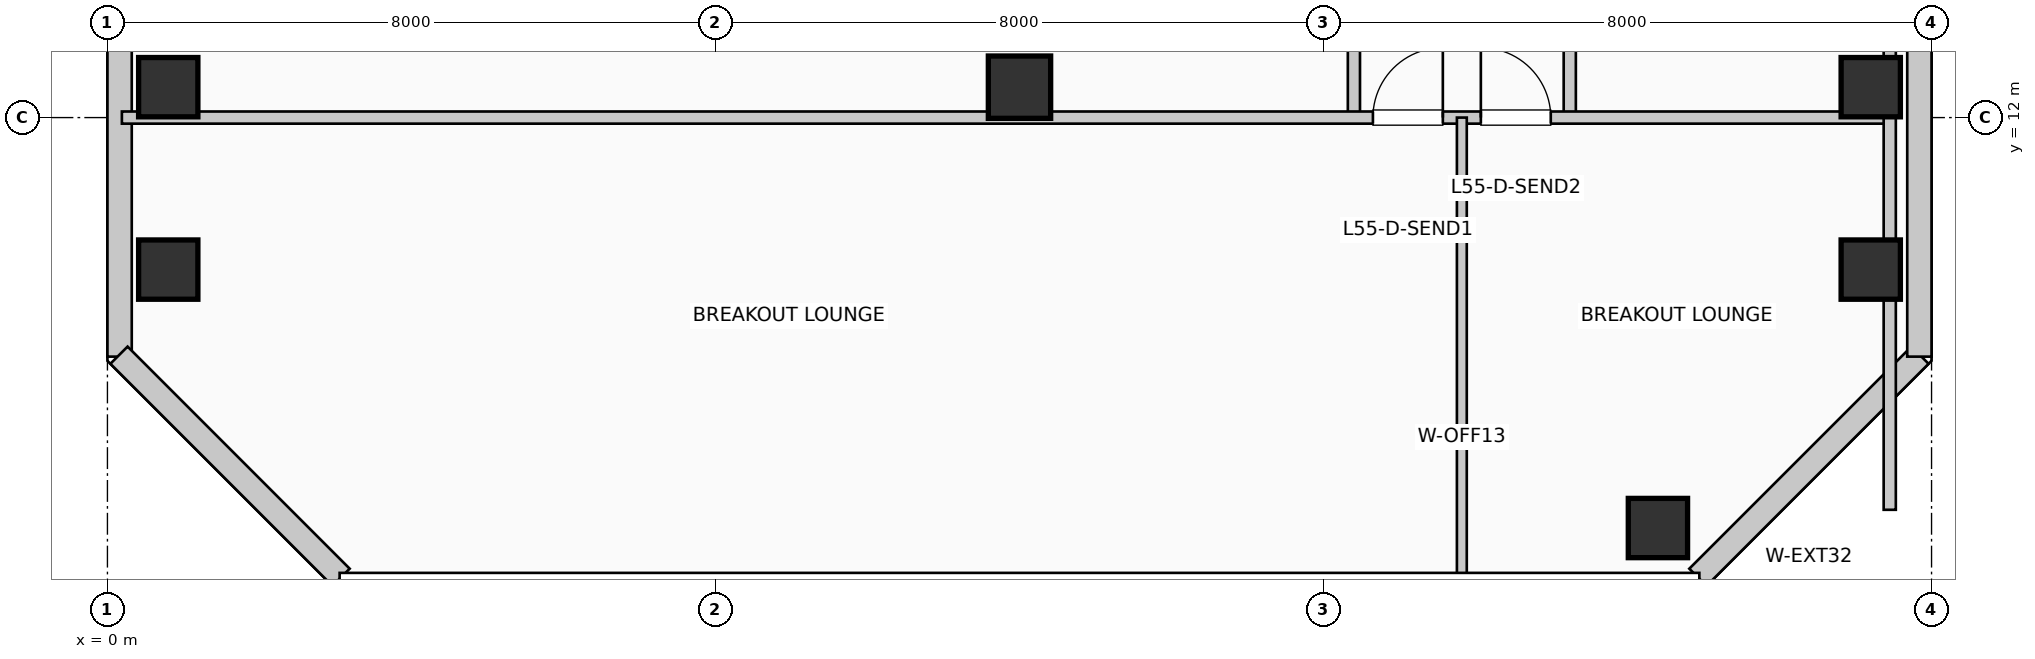
"""IFC4 building model, lengths in metres.
Left out: names, types, materials, properties, quantities, classifications, styles, units other than length and angle.
Written with IfcOpenShell. Run it as: python <this file> out.ifc"""

import sys

from ifc_helpers import new_model, si_unit, direction, frame, frame_2d, origin, origin_2d, place, context, subcontext, project, spatial, rectangle, extrude, element, fill, save


model = new_model("IFC4")
c1 = context("Model", 3, precision=1e-05, world=origin(), true_north=direction((0.0, 1.0)))
c2 = subcontext(c1, "Body", "Model", "MODEL_VIEW")
j1 = project(units=[si_unit("LENGTHUNIT", "METRE"), si_unit("PLANEANGLEUNIT", "RADIAN")], contexts=[c1])
p1 = place(None, origin())
s1 = spatial("IfcSite", under=j1, at=p1, CompositionType="ELEMENT")
p2 = place(p1, origin())
s2 = spatial("IfcBuilding", under=s1, at=p2, CompositionType="ELEMENT")
p3 = place(p2, frame((0.0, 0.0, 227.7)))
s3 = spatial("IfcBuildingStorey", under=s2, at=p3, CompositionType="ELEMENT", Elevation=227.7)
for number, where, z_axis, x_axis in (
    (1, (0.8, 10.0, 0.0), (0.0, 0.0, 1.0), (1.0, 0.0, 0.0)),
    (2, (0.8, 12.4, 0.0), (0.0, 0.0, 1.0), (1.0, 0.0, 0.0)),
):
    element("IfcColumn", number, at=place(p3, frame(where, z_axis=z_axis, x_axis=x_axis)), inside=s3, PredefinedType="COLUMN", context=c2, shape_type="SweptSolid", body=[
        extrude(rectangle(XDim=0.78, YDim=0.78, at=origin_2d()), origin(), (0.0, 0.0, 1.0), 3.96),
    ])
p4 = place(p3, frame((12.0, 12.4, 0.0), z_axis=(0.0, 0.0, 1.0), x_axis=(1.0, 0.0, 0.0)))
e3 = element("IfcColumn", 3, at=p4, inside=s3, PredefinedType="COLUMN", context=c2, shape_type="SweptSolid", body=[
    extrude(rectangle(XDim=0.82, YDim=0.82, at=origin_2d()), origin(), (0.0, 0.0, 1.0), 3.96),
])
for number, where, z_axis, x_axis in (
    (4, (20.4, 6.6, 0.0), (0.0, 0.0, 1.0), (1.0, 0.0, 0.0)),
    (5, (23.2, 10.0, 0.0), (0.0, 0.0, 1.0), (1.0, 0.0, 0.0)),
    (6, (23.2, 12.4, 0.0), (0.0, 0.0, 1.0), (1.0, 0.0, 0.0)),
):
    element("IfcColumn", number, at=place(p3, frame(where, z_axis=z_axis, x_axis=x_axis)), inside=s3, PredefinedType="COLUMN", context=c2, shape_type="SweptSolid", body=[
        extrude(rectangle(XDim=0.78, YDim=0.78, at=origin_2d()), origin(), (0.0, 0.0, 1.0), 3.96),
    ])
p5 = place(p3, frame((20.926, 5.952, 0.0), z_axis=(0.0, 0.0, 1.0), x_axis=(0.707077242712, 0.707136318428, 0.0)))
e7 = element("IfcWall", 7, at=p5, inside=s3, PredefinedType="SOLIDWALL", context=c2, shape_type="SweptSolid", body=[
    extrude(rectangle(XDim=4.133, YDim=0.32, at=frame_2d((2.066, 0.0))), origin(), (0.0, 0.0, 1.0), 3.71),
])
p6 = place(p3, frame((23.84, 8.855, 0.0), z_axis=(0.0, 0.0, 1.0), x_axis=(0.0, 1.0, 0.0)))
e8 = element("IfcWall", 8, at=p6, inside=s3, PredefinedType="SOLIDWALL", context=c2, shape_type="SweptSolid", body=[
    extrude(rectangle(XDim=11.09, YDim=0.32, at=frame_2d((5.545, 0.0))), origin(), (0.0, 0.0, 1.0), 3.71),
])
p7 = place(p3, frame((0.16, 34.395, 0.0), z_axis=(0.0, 0.0, 1.0), x_axis=(0.0, -1.0, 0.0)))
e9 = element("IfcWall", 9, at=p7, inside=s3, PredefinedType="SOLIDWALL", context=c2, shape_type="SweptSolid", body=[
    extrude(rectangle(XDim=25.54, YDim=0.32, at=frame_2d((12.77, 0.0))), origin(), (0.0, 0.0, 1.0), 3.71),
])
p8 = place(p3, frame((0.152, 8.874, 0.0), z_axis=(0.0, 0.0, 1.0), x_axis=(0.707077242712, -0.707136318428, 0.0)))
e10 = element("IfcWall", 10, at=p8, inside=s3, PredefinedType="SOLIDWALL", context=c2, shape_type="SweptSolid", body=[
    extrude(rectangle(XDim=4.133, YDim=0.32, at=frame_2d((2.066, 0.0))), origin(), (0.0, 0.0, 1.0), 3.71),
])
p9 = place(p3, frame((16.4, 12.0, 0.0), z_axis=(0.0, 0.0, 1.0), x_axis=(0.0, 1.0, 0.0)))
e11 = element("IfcWall", 11, at=p9, inside=s3, PredefinedType="PARTITIONING", context=c2, shape_type="SweptSolid", body=[
    extrude(rectangle(XDim=17.4, YDim=0.16, at=frame_2d((8.7, 0.0))), origin(), (0.0, 0.0, 1.0), 3.71),
])
p10 = place(p9, frame((3.433, 0.0, 0.0), z_axis=(0.0, 0.0, 1.0), x_axis=(-1.0, 0.0, 0.0)))
e12 = element("IfcOpeningElement", 12, at=p10, cuts=e11, PredefinedType="OPENING", context=c2, shape_type="SweptSolid", body=[
    extrude(rectangle(XDim=0.95, YDim=2.15, at=frame_2d((0.475, 1.075))), frame((0.0, 0.09, 0.0), z_axis=(0.0, -1.0, 0.0), x_axis=(1.0, 0.0, 0.0)), (0.0, 0.0, 1.0), 0.18),
])
p11 = place(p9, frame((9.349, 0.0, 0.0), z_axis=(0.0, 0.0, 1.0), x_axis=(-1.0, 0.0, 0.0)))
e13 = element("IfcOpeningElement", 13, at=p11, cuts=e11, PredefinedType="OPENING", context=c2, shape_type="SweptSolid", body=[
    extrude(rectangle(XDim=0.95, YDim=2.15, at=frame_2d((0.475, 1.075))), frame((0.0, 0.09, 0.0), z_axis=(0.0, -1.0, 0.0), x_axis=(1.0, 0.0, 0.0)), (0.0, 0.0, 1.0), 0.18),
])
p12 = place(p9, frame((15.091, 0.0, 0.0), z_axis=(0.0, 0.0, 1.0), x_axis=(-1.0, 0.0, 0.0)))
e14 = element("IfcOpeningElement", 14, at=p12, cuts=e11, PredefinedType="OPENING", context=c2, shape_type="SweptSolid", body=[
    extrude(rectangle(XDim=0.95, YDim=2.15, at=frame_2d((0.475, 1.075))), frame((0.0, 0.09, 0.0), z_axis=(0.0, -1.0, 0.0), x_axis=(1.0, 0.0, 0.0)), (0.0, 0.0, 1.0), 0.18),
])
p13 = place(p3, frame((19.24, 12.0, 0.0), z_axis=(0.0, 0.0, 1.0), x_axis=(0.0, 1.0, 0.0)))
e15 = element("IfcWall", 15, at=p13, inside=s3, PredefinedType="PARTITIONING", context=c2, shape_type="SweptSolid", body=[
    extrude(rectangle(XDim=17.4, YDim=0.16, at=frame_2d((8.7, 0.0))), origin(), (0.0, 0.0, 1.0), 3.71),
])
p14 = place(p13, frame((8.225, 0.0, 0.0)))
e16 = element("IfcOpeningElement", 16, at=p14, cuts=e15, PredefinedType="OPENING", context=c2, shape_type="SweptSolid", body=[
    extrude(rectangle(XDim=0.95, YDim=2.15, at=frame_2d((0.475, 1.075))), frame((0.0, 0.09, 0.0), z_axis=(0.0, -1.0, 0.0), x_axis=(1.0, 0.0, 0.0)), (0.0, 0.0, 1.0), 0.18),
])
p15 = place(p3, frame((0.19, 12.0, 0.0), z_axis=(0.0, 0.0, 1.0), x_axis=(1.0, 0.0, 0.0)))
e17 = element("IfcWall", 17, at=p15, inside=s3, PredefinedType="PARTITIONING", context=c2, shape_type="SweptSolid", body=[
    extrude(rectangle(XDim=23.26, YDim=0.16, at=frame_2d((11.63, 0.0))), origin(), (0.0, 0.0, 1.0), 3.095),
])
p16 = place(p15, frame((16.46, 0.0, 0.0)))
e18 = element("IfcOpeningElement", 18, at=p16, cuts=e17, PredefinedType="OPENING", context=c2, shape_type="SweptSolid", body=[
    extrude(rectangle(XDim=0.92, YDim=2.1, at=frame_2d((0.46, 1.05))), frame((0.0, 0.09, 0.0), z_axis=(0.0, -1.0, 0.0), x_axis=(1.0, 0.0, 0.0)), (0.0, 0.0, 1.0), 0.18),
])
p17 = place(p15, frame((17.88, 0.0, 0.0)))
e19 = element("IfcOpeningElement", 19, at=p17, cuts=e17, PredefinedType="OPENING", context=c2, shape_type="SweptSolid", body=[
    extrude(rectangle(XDim=0.92, YDim=2.1, at=frame_2d((0.46, 1.05))), frame((0.0, 0.09, 0.0), z_axis=(0.0, -1.0, 0.0), x_axis=(1.0, 0.0, 0.0)), (0.0, 0.0, 1.0), 0.18),
])
p18 = place(p3, frame((23.45, 6.84, 0.0), z_axis=(0.0, 0.0, 1.0), x_axis=(0.0, 1.0, 0.0)))
e20 = element("IfcWall", 20, at=p18, inside=s3, PredefinedType="PARTITIONING", context=c2, shape_type="SweptSolid", body=[
    extrude(rectangle(XDim=22.56, YDim=0.16, at=frame_2d((11.28, 0.0))), origin(), (0.0, 0.0, 1.0), 3.095),
])
p19 = place(p3, frame((17.82, 5.99, 0.0), z_axis=(0.0, 0.0, 1.0), x_axis=(0.0, 1.0, 0.0)))
e21 = element("IfcWall", 21, at=p19, inside=s3, PredefinedType="PARTITIONING", context=c2, shape_type="SweptSolid", body=[
    extrude(rectangle(XDim=6.01, YDim=0.13, at=frame_2d((3.005, 0.0))), origin(), (0.0, 0.0, 1.0), 3.71),
])
p20 = place(p16, origin())
e22 = element("IfcDoor", 22, at=p20, inside=s3, OperationType="SINGLE_SWING_RIGHT", PredefinedType="DOOR", context=c2, shape_type="SweptSolid", body=[
    extrude(rectangle(XDim=0.92, YDim=2.1, at=frame_2d((0.46, 1.05))), frame((0.0, 0.025, 0.0), z_axis=(0.0, -1.0, 0.0), x_axis=(1.0, 0.0, 0.0)), (0.0, 0.0, 1.0), 0.05),
])
fill(e18, e22)
p21 = place(p17, origin())
e23 = element("IfcDoor", 23, at=p21, inside=s3, OperationType="SINGLE_SWING_LEFT", PredefinedType="DOOR", context=c2, shape_type="SweptSolid", body=[
    extrude(rectangle(XDim=0.92, YDim=2.1, at=frame_2d((0.46, 1.05))), frame((0.0, 0.025, 0.0), z_axis=(0.0, -1.0, 0.0), x_axis=(1.0, 0.0, 0.0)), (0.0, 0.0, 1.0), 0.05),
])
fill(e19, e23)
save(model, sys.argv[1])
